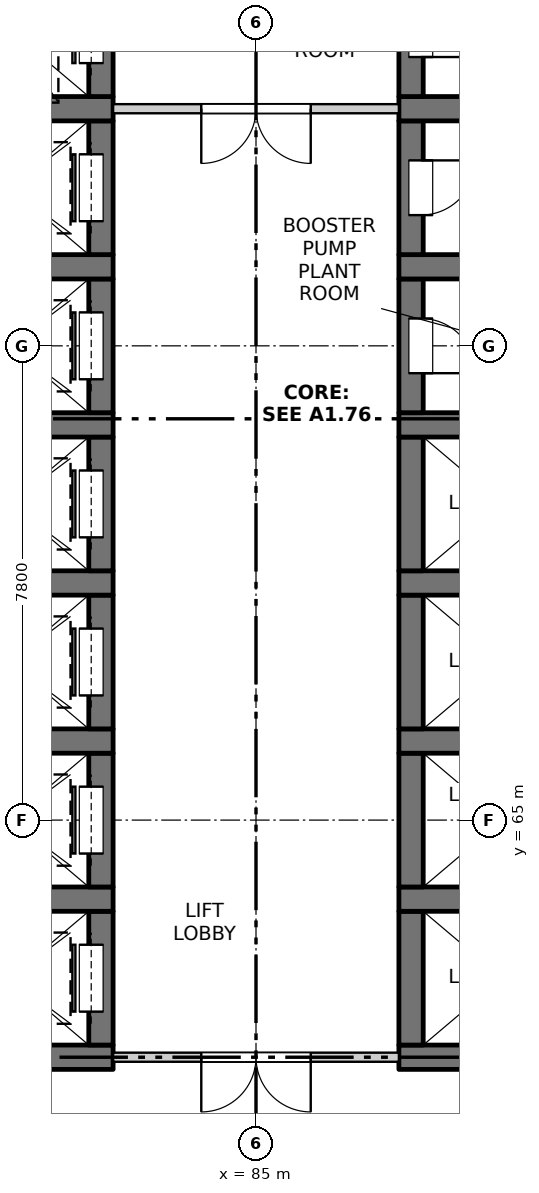
"""IFC4 building model, lengths in metres.
Left out: names, types, materials, properties, quantities, classifications, styles, units other than length and angle.
Written with IfcOpenShell. Run it as: python <this file> out.ifc"""

import sys

from ifc_helpers import new_model, si_unit, direction, frame, frame_2d, origin, place, context, subcontext, project, spatial, rectangle, extrude, element, fill, save


model = new_model("IFC4")
c1 = context("Model", 3, precision=1e-05, world=origin(), true_north=direction((0.0, 1.0)))
c2 = subcontext(c1, "Body", "Model", "MODEL_VIEW")
j1 = project(units=[si_unit("LENGTHUNIT", "METRE"), si_unit("PLANEANGLEUNIT", "RADIAN")], contexts=[c1])
p1 = place(None, origin())
s1 = spatial("IfcSite", under=j1, at=p1, CompositionType="ELEMENT")
p2 = place(p1, origin())
s2 = spatial("IfcBuilding", under=s1, at=p2, CompositionType="ELEMENT")
p3 = place(p2, frame((0.0, 0.0, 46.7)))
s3 = spatial("IfcBuildingStorey", under=s2, at=p3, CompositionType="ELEMENT", Elevation=46.7)
p4 = place(p3, frame((79.65, 61.1, -0.3), z_axis=(0.0, 0.0, 1.0), x_axis=(1.0, 0.0, 0.0)))
e1 = element("IfcWall", 1, at=p4, inside=s3, PredefinedType="SOLIDWALL", context=c2, shape_type="SweptSolid", body=[
    extrude(rectangle(XDim=3.0, YDim=0.4, at=frame_2d((1.5, 0.0))), origin(), (0.0, 0.0, 1.0), 4.5),
])
p5 = place(p3, frame((82.45, 61.3, -0.3), z_axis=(0.0, 0.0, 1.0), x_axis=(0.0, 1.0, 0.0)))
e2 = element("IfcWall", 2, at=p5, inside=s3, PredefinedType="SOLIDWALL", context=c2, shape_type="SweptSolid", body=[
    extrude(rectangle(XDim=2.2, YDim=0.4, at=frame_2d((1.1, 0.0))), origin(), (0.0, 0.0, 1.0), 4.5),
])
p6 = place(p5, frame((0.55, 0.0, 0.3)))
e3 = element("IfcOpeningElement", 3, at=p6, cuts=e2, PredefinedType="OPENING", context=c2, shape_type="SweptSolid", body=[
    extrude(rectangle(XDim=1.1, YDim=2.1, at=frame_2d((0.55, 1.05))), frame((0.0, 0.21, 0.0), z_axis=(0.0, -1.0, 0.0), x_axis=(1.0, 0.0, 0.0)), (0.0, 0.0, 1.0), 0.42),
])
p7 = place(p3, frame((79.65, 63.7, -0.3), z_axis=(0.0, 0.0, 1.0), x_axis=(1.0, 0.0, 0.0)))
e4 = element("IfcWall", 4, at=p7, inside=s3, PredefinedType="SOLIDWALL", context=c2, shape_type="SweptSolid", body=[
    extrude(rectangle(XDim=3.0, YDim=0.4, at=frame_2d((1.5, 0.0))), origin(), (0.0, 0.0, 1.0), 4.5),
])
p8 = place(p3, frame((82.45, 63.9, -0.3), z_axis=(0.0, 0.0, 1.0), x_axis=(0.0, 1.0, 0.0)))
e5 = element("IfcWall", 5, at=p8, inside=s3, PredefinedType="SOLIDWALL", context=c2, shape_type="SweptSolid", body=[
    extrude(rectangle(XDim=2.2, YDim=0.4, at=frame_2d((1.1, 0.0))), origin(), (0.0, 0.0, 1.0), 4.5),
])
p9 = place(p8, frame((0.55, 0.0, 0.3)))
e6 = element("IfcOpeningElement", 6, at=p9, cuts=e5, PredefinedType="OPENING", context=c2, shape_type="SweptSolid", body=[
    extrude(rectangle(XDim=1.1, YDim=2.1, at=frame_2d((0.55, 1.05))), frame((0.0, 0.21, 0.0), z_axis=(0.0, -1.0, 0.0), x_axis=(1.0, 0.0, 0.0)), (0.0, 0.0, 1.0), 0.42),
])
p10 = place(p3, frame((79.65, 66.3, -0.3), z_axis=(0.0, 0.0, 1.0), x_axis=(1.0, 0.0, 0.0)))
e7 = element("IfcWall", 7, at=p10, inside=s3, PredefinedType="SOLIDWALL", context=c2, shape_type="SweptSolid", body=[
    extrude(rectangle(XDim=3.0, YDim=0.4, at=frame_2d((1.5, 0.0))), origin(), (0.0, 0.0, 1.0), 4.5),
])
p11 = place(p3, frame((82.45, 66.5, -0.3), z_axis=(0.0, 0.0, 1.0), x_axis=(0.0, 1.0, 0.0)))
e8 = element("IfcWall", 8, at=p11, inside=s3, PredefinedType="SOLIDWALL", context=c2, shape_type="SweptSolid", body=[
    extrude(rectangle(XDim=2.2, YDim=0.4, at=frame_2d((1.1, 0.0))), origin(), (0.0, 0.0, 1.0), 4.5),
])
p12 = place(p11, frame((0.55, 0.0, 0.3)))
e9 = element("IfcOpeningElement", 9, at=p12, cuts=e8, PredefinedType="OPENING", context=c2, shape_type="SweptSolid", body=[
    extrude(rectangle(XDim=1.1, YDim=2.1, at=frame_2d((0.55, 1.05))), frame((0.0, 0.21, 0.0), z_axis=(0.0, -1.0, 0.0), x_axis=(1.0, 0.0, 0.0)), (0.0, 0.0, 1.0), 0.42),
])
p13 = place(p3, frame((79.65, 68.9, -0.3), z_axis=(0.0, 0.0, 1.0), x_axis=(1.0, 0.0, 0.0)))
e10 = element("IfcWall", 10, at=p13, inside=s3, PredefinedType="SOLIDWALL", context=c2, shape_type="SweptSolid", body=[
    extrude(rectangle(XDim=3.0, YDim=0.4, at=frame_2d((1.5, 0.0))), origin(), (0.0, 0.0, 1.0), 4.5),
])
p14 = place(p3, frame((82.45, 69.1, -0.3), z_axis=(0.0, 0.0, 1.0), x_axis=(0.0, 1.0, 0.0)))
e11 = element("IfcWall", 11, at=p14, inside=s3, PredefinedType="SOLIDWALL", context=c2, shape_type="SweptSolid", body=[
    extrude(rectangle(XDim=2.2, YDim=0.4, at=frame_2d((1.1, 0.0))), origin(), (0.0, 0.0, 1.0), 4.5),
])
p15 = place(p14, frame((0.55, 0.0, 0.3)))
e12 = element("IfcOpeningElement", 12, at=p15, cuts=e11, PredefinedType="OPENING", context=c2, shape_type="SweptSolid", body=[
    extrude(rectangle(XDim=1.1, YDim=2.1, at=frame_2d((0.55, 1.05))), frame((0.0, 0.21, 0.0), z_axis=(0.0, -1.0, 0.0), x_axis=(1.0, 0.0, 0.0)), (0.0, 0.0, 1.0), 0.42),
])
p16 = place(p3, frame((79.65, 71.5, -0.3), z_axis=(0.0, 0.0, 1.0), x_axis=(1.0, 0.0, 0.0)))
e13 = element("IfcWall", 13, at=p16, inside=s3, PredefinedType="SOLIDWALL", context=c2, shape_type="SweptSolid", body=[
    extrude(rectangle(XDim=3.0, YDim=0.4, at=frame_2d((1.5, 0.0))), origin(), (0.0, 0.0, 1.0), 4.5),
])
p17 = place(p3, frame((82.45, 71.7, -0.3), z_axis=(0.0, 0.0, 1.0), x_axis=(0.0, 1.0, 0.0)))
e14 = element("IfcWall", 14, at=p17, inside=s3, PredefinedType="SOLIDWALL", context=c2, shape_type="SweptSolid", body=[
    extrude(rectangle(XDim=2.2, YDim=0.4, at=frame_2d((1.1, 0.0))), origin(), (0.0, 0.0, 1.0), 4.5),
])
p18 = place(p17, frame((0.55, 0.0, 0.3)))
e15 = element("IfcOpeningElement", 15, at=p18, cuts=e14, PredefinedType="OPENING", context=c2, shape_type="SweptSolid", body=[
    extrude(rectangle(XDim=1.1, YDim=2.1, at=frame_2d((0.55, 1.05))), frame((0.0, 0.21, 0.0), z_axis=(0.0, -1.0, 0.0), x_axis=(1.0, 0.0, 0.0)), (0.0, 0.0, 1.0), 0.42),
])
p19 = place(p3, frame((79.65, 74.1, -0.3), z_axis=(0.0, 0.0, 1.0), x_axis=(1.0, 0.0, 0.0)))
e16 = element("IfcWall", 16, at=p19, inside=s3, PredefinedType="SOLIDWALL", context=c2, shape_type="SweptSolid", body=[
    extrude(rectangle(XDim=3.0, YDim=0.4, at=frame_2d((1.5, 0.0))), origin(), (0.0, 0.0, 1.0), 4.5),
])
p20 = place(p3, frame((82.45, 74.3, -0.3), z_axis=(0.0, 0.0, 1.0), x_axis=(0.0, 1.0, 0.0)))
e17 = element("IfcWall", 17, at=p20, inside=s3, PredefinedType="SOLIDWALL", context=c2, shape_type="SweptSolid", body=[
    extrude(rectangle(XDim=2.2, YDim=0.4, at=frame_2d((1.1, 0.0))), origin(), (0.0, 0.0, 1.0), 4.5),
])
p21 = place(p20, frame((0.55, 0.0, 0.3)))
e18 = element("IfcOpeningElement", 18, at=p21, cuts=e17, PredefinedType="OPENING", context=c2, shape_type="SweptSolid", body=[
    extrude(rectangle(XDim=1.1, YDim=2.1, at=frame_2d((0.55, 1.05))), frame((0.0, 0.21, 0.0), z_axis=(0.0, -1.0, 0.0), x_axis=(1.0, 0.0, 0.0)), (0.0, 0.0, 1.0), 0.42),
])
p22 = place(p3, frame((79.65, 76.7, -0.3), z_axis=(0.0, 0.0, 1.0), x_axis=(1.0, 0.0, 0.0)))
e19 = element("IfcWall", 19, at=p22, inside=s3, PredefinedType="SOLIDWALL", context=c2, shape_type="SweptSolid", body=[
    extrude(rectangle(XDim=3.0, YDim=0.4, at=frame_2d((1.5, 0.0))), origin(), (0.0, 0.0, 1.0), 4.5),
])
p23 = place(p3, frame((82.45, 76.9, -0.3), z_axis=(0.0, 0.0, 1.0), x_axis=(0.0, 1.0, 0.0)))
e20 = element("IfcWall", 20, at=p23, inside=s3, PredefinedType="SOLIDWALL", context=c2, shape_type="SweptSolid", body=[
    extrude(rectangle(XDim=2.2, YDim=0.4, at=frame_2d((1.1, 0.0))), origin(), (0.0, 0.0, 1.0), 4.5),
])
p24 = place(p23, frame((0.55, 0.0, 0.3)))
e21 = element("IfcOpeningElement", 21, at=p24, cuts=e20, PredefinedType="OPENING", context=c2, shape_type="SweptSolid", body=[
    extrude(rectangle(XDim=1.1, YDim=2.1, at=frame_2d((0.55, 1.05))), frame((0.0, 0.21, 0.0), z_axis=(0.0, -1.0, 0.0), x_axis=(1.0, 0.0, 0.0)), (0.0, 0.0, 1.0), 0.42),
])
p25 = place(p3, frame((87.35, 61.1, -0.3), z_axis=(0.0, 0.0, 1.0), x_axis=(1.0, 0.0, 0.0)))
e22 = element("IfcWall", 22, at=p25, inside=s3, PredefinedType="SOLIDWALL", context=c2, shape_type="SweptSolid", body=[
    extrude(rectangle(XDim=3.0, YDim=0.4, at=frame_2d((1.5, 0.0))), origin(), (0.0, 0.0, 1.0), 4.5),
])
p26 = place(p3, frame((87.55, 61.3, -0.3), z_axis=(0.0, 0.0, 1.0), x_axis=(0.0, 1.0, 0.0)))
e23 = element("IfcWall", 23, at=p26, inside=s3, PredefinedType="SOLIDWALL", context=c2, shape_type="SweptSolid", body=[
    extrude(rectangle(XDim=2.2, YDim=0.4, at=frame_2d((1.1, 0.0))), origin(), (0.0, 0.0, 1.0), 4.5),
])
p27 = place(p3, frame((87.35, 63.7, -0.3), z_axis=(0.0, 0.0, 1.0), x_axis=(1.0, 0.0, 0.0)))
e24 = element("IfcWall", 24, at=p27, inside=s3, PredefinedType="SOLIDWALL", context=c2, shape_type="SweptSolid", body=[
    extrude(rectangle(XDim=3.0, YDim=0.4, at=frame_2d((1.5, 0.0))), origin(), (0.0, 0.0, 1.0), 4.5),
])
p28 = place(p3, frame((87.55, 63.9, -0.3), z_axis=(0.0, 0.0, 1.0), x_axis=(0.0, 1.0, 0.0)))
e25 = element("IfcWall", 25, at=p28, inside=s3, PredefinedType="SOLIDWALL", context=c2, shape_type="SweptSolid", body=[
    extrude(rectangle(XDim=2.2, YDim=0.4, at=frame_2d((1.1, 0.0))), origin(), (0.0, 0.0, 1.0), 4.5),
])
p29 = place(p3, frame((87.35, 66.3, -0.3), z_axis=(0.0, 0.0, 1.0), x_axis=(1.0, 0.0, 0.0)))
e26 = element("IfcWall", 26, at=p29, inside=s3, PredefinedType="SOLIDWALL", context=c2, shape_type="SweptSolid", body=[
    extrude(rectangle(XDim=3.0, YDim=0.4, at=frame_2d((1.5, 0.0))), origin(), (0.0, 0.0, 1.0), 4.5),
])
p30 = place(p3, frame((87.55, 66.5, -0.3), z_axis=(0.0, 0.0, 1.0), x_axis=(0.0, 1.0, 0.0)))
e27 = element("IfcWall", 27, at=p30, inside=s3, PredefinedType="SOLIDWALL", context=c2, shape_type="SweptSolid", body=[
    extrude(rectangle(XDim=2.2, YDim=0.4, at=frame_2d((1.1, 0.0))), origin(), (0.0, 0.0, 1.0), 4.5),
])
p31 = place(p3, frame((87.35, 68.9, -0.3), z_axis=(0.0, 0.0, 1.0), x_axis=(1.0, 0.0, 0.0)))
e28 = element("IfcWall", 28, at=p31, inside=s3, PredefinedType="SOLIDWALL", context=c2, shape_type="SweptSolid", body=[
    extrude(rectangle(XDim=3.0, YDim=0.4, at=frame_2d((1.5, 0.0))), origin(), (0.0, 0.0, 1.0), 4.5),
])
p32 = place(p3, frame((87.55, 69.1, -0.3), z_axis=(0.0, 0.0, 1.0), x_axis=(0.0, 1.0, 0.0)))
e29 = element("IfcWall", 29, at=p32, inside=s3, PredefinedType="SOLIDWALL", context=c2, shape_type="SweptSolid", body=[
    extrude(rectangle(XDim=2.2, YDim=0.4, at=frame_2d((1.1, 0.0))), origin(), (0.0, 0.0, 1.0), 4.5),
])
p33 = place(p3, frame((87.35, 71.5, -0.3), z_axis=(0.0, 0.0, 1.0), x_axis=(1.0, 0.0, 0.0)))
e30 = element("IfcWall", 30, at=p33, inside=s3, PredefinedType="SOLIDWALL", context=c2, shape_type="SweptSolid", body=[
    extrude(rectangle(XDim=3.0, YDim=0.4, at=frame_2d((1.5, 0.0))), origin(), (0.0, 0.0, 1.0), 4.5),
])
p34 = place(p3, frame((87.55, 71.7, -0.3), z_axis=(0.0, 0.0, 1.0), x_axis=(0.0, 1.0, 0.0)))
e31 = element("IfcWall", 31, at=p34, inside=s3, PredefinedType="SOLIDWALL", context=c2, shape_type="SweptSolid", body=[
    extrude(rectangle(XDim=2.2, YDim=0.4, at=frame_2d((1.1, 0.0))), origin(), (0.0, 0.0, 1.0), 4.5),
])
p35 = place(p34, frame((0.65, 0.0, 0.3)))
e32 = element("IfcOpeningElement", 32, at=p35, cuts=e31, PredefinedType="OPENING", context=c2, shape_type="SweptSolid", body=[
    extrude(rectangle(XDim=0.9, YDim=2.1, at=frame_2d((0.45, 1.05))), frame((0.0, 0.21, 0.0), z_axis=(0.0, -1.0, 0.0), x_axis=(1.0, 0.0, 0.0)), (0.0, 0.0, 1.0), 0.42),
])
p36 = place(p3, frame((87.35, 74.1, -0.3), z_axis=(0.0, 0.0, 1.0), x_axis=(1.0, 0.0, 0.0)))
e33 = element("IfcWall", 33, at=p36, inside=s3, PredefinedType="SOLIDWALL", context=c2, shape_type="SweptSolid", body=[
    extrude(rectangle(XDim=3.0, YDim=0.4, at=frame_2d((1.5, 0.0))), origin(), (0.0, 0.0, 1.0), 4.5),
])
p37 = place(p3, frame((87.55, 74.3, -0.3), z_axis=(0.0, 0.0, 1.0), x_axis=(0.0, 1.0, 0.0)))
e34 = element("IfcWall", 34, at=p37, inside=s3, PredefinedType="SOLIDWALL", context=c2, shape_type="SweptSolid", body=[
    extrude(rectangle(XDim=2.2, YDim=0.4, at=frame_2d((1.1, 0.0))), origin(), (0.0, 0.0, 1.0), 4.5),
])
p38 = place(p37, frame((0.65, 0.0, 0.3)))
e35 = element("IfcOpeningElement", 35, at=p38, cuts=e34, PredefinedType="OPENING", context=c2, shape_type="SweptSolid", body=[
    extrude(rectangle(XDim=0.9, YDim=2.1, at=frame_2d((0.45, 1.05))), frame((0.0, 0.21, 0.0), z_axis=(0.0, -1.0, 0.0), x_axis=(1.0, 0.0, 0.0)), (0.0, 0.0, 1.0), 0.42),
])
p39 = place(p3, frame((87.35, 76.7, -0.3), z_axis=(0.0, 0.0, 1.0), x_axis=(1.0, 0.0, 0.0)))
e36 = element("IfcWall", 36, at=p39, inside=s3, PredefinedType="SOLIDWALL", context=c2, shape_type="SweptSolid", body=[
    extrude(rectangle(XDim=3.0, YDim=0.4, at=frame_2d((1.5, 0.0))), origin(), (0.0, 0.0, 1.0), 4.5),
])
p40 = place(p3, frame((87.55, 76.9, -0.3), z_axis=(0.0, 0.0, 1.0), x_axis=(0.0, 1.0, 0.0)))
e37 = element("IfcWall", 37, at=p40, inside=s3, PredefinedType="SOLIDWALL", context=c2, shape_type="SweptSolid", body=[
    extrude(rectangle(XDim=2.2, YDim=0.4, at=frame_2d((1.1, 0.0))), origin(), (0.0, 0.0, 1.0), 4.5),
])
p41 = place(p40, frame((0.65, 0.0, 0.3)))
e38 = element("IfcOpeningElement", 38, at=p41, cuts=e37, PredefinedType="OPENING", context=c2, shape_type="SweptSolid", body=[
    extrude(rectangle(XDim=0.9, YDim=2.1, at=frame_2d((0.45, 1.05))), frame((0.0, 0.21, 0.0), z_axis=(0.0, -1.0, 0.0), x_axis=(1.0, 0.0, 0.0)), (0.0, 0.0, 1.0), 0.42),
])
p42 = place(p3, frame((82.65, 61.1, 0.0), z_axis=(0.0, 0.0, 1.0), x_axis=(1.0, 0.0, 0.0)))
e39 = element("IfcWall", 39, at=p42, inside=s3, PredefinedType="PARTITIONING", context=c2, shape_type="SweptSolid", body=[
    extrude(rectangle(XDim=4.7, YDim=0.15, at=frame_2d((2.35, 0.0))), origin(), (0.0, 0.0, 1.0), 4.2),
])
p43 = place(p42, frame((1.45, 0.0, 0.0)))
e40 = element("IfcOpeningElement", 40, at=p43, cuts=e39, PredefinedType="OPENING", context=c2, shape_type="SweptSolid", body=[
    extrude(rectangle(XDim=1.8, YDim=2.1, at=frame_2d((0.9, 1.05))), frame((0.0, 0.085, 0.0), z_axis=(0.0, -1.0, 0.0), x_axis=(1.0, 0.0, 0.0)), (0.0, 0.0, 1.0), 0.17),
])
p44 = place(p3, frame((82.65, 76.7, 0.0), z_axis=(0.0, 0.0, 1.0), x_axis=(1.0, 0.0, 0.0)))
e41 = element("IfcWall", 41, at=p44, inside=s3, PredefinedType="PARTITIONING", context=c2, shape_type="SweptSolid", body=[
    extrude(rectangle(XDim=4.7, YDim=0.15, at=frame_2d((2.35, 0.0))), origin(), (0.0, 0.0, 1.0), 4.2),
])
p45 = place(p44, frame((1.45, 0.0, 0.0)))
e42 = element("IfcOpeningElement", 42, at=p45, cuts=e41, PredefinedType="OPENING", context=c2, shape_type="SweptSolid", body=[
    extrude(rectangle(XDim=1.8, YDim=2.1, at=frame_2d((0.9, 1.05))), frame((0.0, 0.085, 0.0), z_axis=(0.0, -1.0, 0.0), x_axis=(1.0, 0.0, 0.0)), (0.0, 0.0, 1.0), 0.17),
])
p46 = place(p43, origin())
e43 = element("IfcDoor", 43, at=p46, inside=s3, OperationType="DOUBLE_DOOR_SINGLE_SWING", PredefinedType="DOOR", context=c2, shape_type="SweptSolid", body=[
    extrude(rectangle(XDim=1.8, YDim=2.1, at=frame_2d((0.9, 1.05))), frame((0.0, 0.025, 0.0), z_axis=(0.0, -1.0, 0.0), x_axis=(1.0, 0.0, 0.0)), (0.0, 0.0, 1.0), 0.05),
])
fill(e40, e43)
p47 = place(p6, origin())
e44 = element("IfcDoor", 44, at=p47, inside=s3, OperationType="SLIDING_TO_RIGHT", PredefinedType="DOOR", context=c2, shape_type="SweptSolid", body=[
    extrude(rectangle(XDim=1.1, YDim=2.1, at=frame_2d((0.55, 1.05))), frame((0.0, 0.185, 0.0), z_axis=(0.0, -1.0, 0.0), x_axis=(1.0, 0.0, 0.0)), (0.0, 0.0, 1.0), 0.05),
])
fill(e3, e44)
p48 = place(p9, origin())
e45 = element("IfcDoor", 45, at=p48, inside=s3, OperationType="SLIDING_TO_RIGHT", PredefinedType="DOOR", context=c2, shape_type="SweptSolid", body=[
    extrude(rectangle(XDim=1.1, YDim=2.1, at=frame_2d((0.55, 1.05))), frame((0.0, 0.185, 0.0), z_axis=(0.0, -1.0, 0.0), x_axis=(1.0, 0.0, 0.0)), (0.0, 0.0, 1.0), 0.05),
])
fill(e6, e45)
p49 = place(p12, origin())
e46 = element("IfcDoor", 46, at=p49, inside=s3, OperationType="SLIDING_TO_RIGHT", PredefinedType="DOOR", context=c2, shape_type="SweptSolid", body=[
    extrude(rectangle(XDim=1.1, YDim=2.1, at=frame_2d((0.55, 1.05))), frame((0.0, 0.185, 0.0), z_axis=(0.0, -1.0, 0.0), x_axis=(1.0, 0.0, 0.0)), (0.0, 0.0, 1.0), 0.05),
])
fill(e9, e46)
p50 = place(p15, origin())
e47 = element("IfcDoor", 47, at=p50, inside=s3, OperationType="SLIDING_TO_LEFT", PredefinedType="DOOR", context=c2, shape_type="SweptSolid", body=[
    extrude(rectangle(XDim=1.1, YDim=2.1, at=frame_2d((0.55, 1.05))), frame((0.0, 0.185, 0.0), z_axis=(0.0, -1.0, 0.0), x_axis=(1.0, 0.0, 0.0)), (0.0, 0.0, 1.0), 0.05),
])
fill(e12, e47)
p51 = place(p18, origin())
e48 = element("IfcDoor", 48, at=p51, inside=s3, OperationType="SLIDING_TO_LEFT", PredefinedType="DOOR", context=c2, shape_type="SweptSolid", body=[
    extrude(rectangle(XDim=1.1, YDim=2.1, at=frame_2d((0.55, 1.05))), frame((0.0, 0.185, 0.0), z_axis=(0.0, -1.0, 0.0), x_axis=(1.0, 0.0, 0.0)), (0.0, 0.0, 1.0), 0.05),
])
fill(e15, e48)
p52 = place(p35, origin())
e49 = element("IfcDoor", 49, at=p52, inside=s3, OperationType="SINGLE_SWING_RIGHT", PredefinedType="DOOR", context=c2, shape_type="SweptSolid", body=[
    extrude(rectangle(XDim=0.9, YDim=2.1, at=frame_2d((0.45, 1.05))), frame((0.0, -0.135, 0.0), z_axis=(0.0, -1.0, 0.0), x_axis=(1.0, 0.0, 0.0)), (0.0, 0.0, 1.0), 0.05),
])
fill(e32, e49)
p53 = place(p21, origin())
e50 = element("IfcDoor", 50, at=p53, inside=s3, OperationType="SLIDING_TO_LEFT", PredefinedType="DOOR", context=c2, shape_type="SweptSolid", body=[
    extrude(rectangle(XDim=1.1, YDim=2.1, at=frame_2d((0.55, 1.05))), frame((0.0, 0.185, 0.0), z_axis=(0.0, -1.0, 0.0), x_axis=(1.0, 0.0, 0.0)), (0.0, 0.0, 1.0), 0.05),
])
fill(e18, e50)
p54 = place(p38, origin())
e51 = element("IfcDoor", 51, at=p54, inside=s3, OperationType="SINGLE_SWING_LEFT", PredefinedType="DOOR", context=c2, shape_type="SweptSolid", body=[
    extrude(rectangle(XDim=0.9, YDim=2.1, at=frame_2d((0.45, 1.05))), frame((0.0, -0.135, 0.0), z_axis=(0.0, -1.0, 0.0), x_axis=(1.0, 0.0, 0.0)), (0.0, 0.0, 1.0), 0.05),
])
fill(e35, e51)
p55 = place(p45, origin())
e52 = element("IfcDoor", 52, at=p55, inside=s3, OperationType="DOUBLE_DOOR_SINGLE_SWING", PredefinedType="DOOR", context=c2, shape_type="SweptSolid", body=[
    extrude(rectangle(XDim=1.8, YDim=2.1, at=frame_2d((0.9, 1.05))), frame((0.0, 0.025, 0.0), z_axis=(0.0, -1.0, 0.0), x_axis=(1.0, 0.0, 0.0)), (0.0, 0.0, 1.0), 0.05),
])
fill(e42, e52)
p56 = place(p24, origin())
e53 = element("IfcDoor", 53, at=p56, inside=s3, OperationType="SLIDING_TO_LEFT", PredefinedType="DOOR", context=c2, shape_type="SweptSolid", body=[
    extrude(rectangle(XDim=1.1, YDim=2.1, at=frame_2d((0.55, 1.05))), frame((0.0, 0.185, 0.0), z_axis=(0.0, -1.0, 0.0), x_axis=(1.0, 0.0, 0.0)), (0.0, 0.0, 1.0), 0.05),
])
fill(e21, e53)
p57 = place(p41, origin())
e54 = element("IfcDoor", 54, at=p57, inside=s3, OperationType="SINGLE_SWING_RIGHT", PredefinedType="DOOR", context=c2, shape_type="SweptSolid", body=[
    extrude(rectangle(XDim=0.9, YDim=2.1, at=frame_2d((0.45, 1.05))), frame((0.0, -0.135, 0.0), z_axis=(0.0, -1.0, 0.0), x_axis=(1.0, 0.0, 0.0)), (0.0, 0.0, 1.0), 0.05),
])
fill(e38, e54)
save(model, sys.argv[1])
